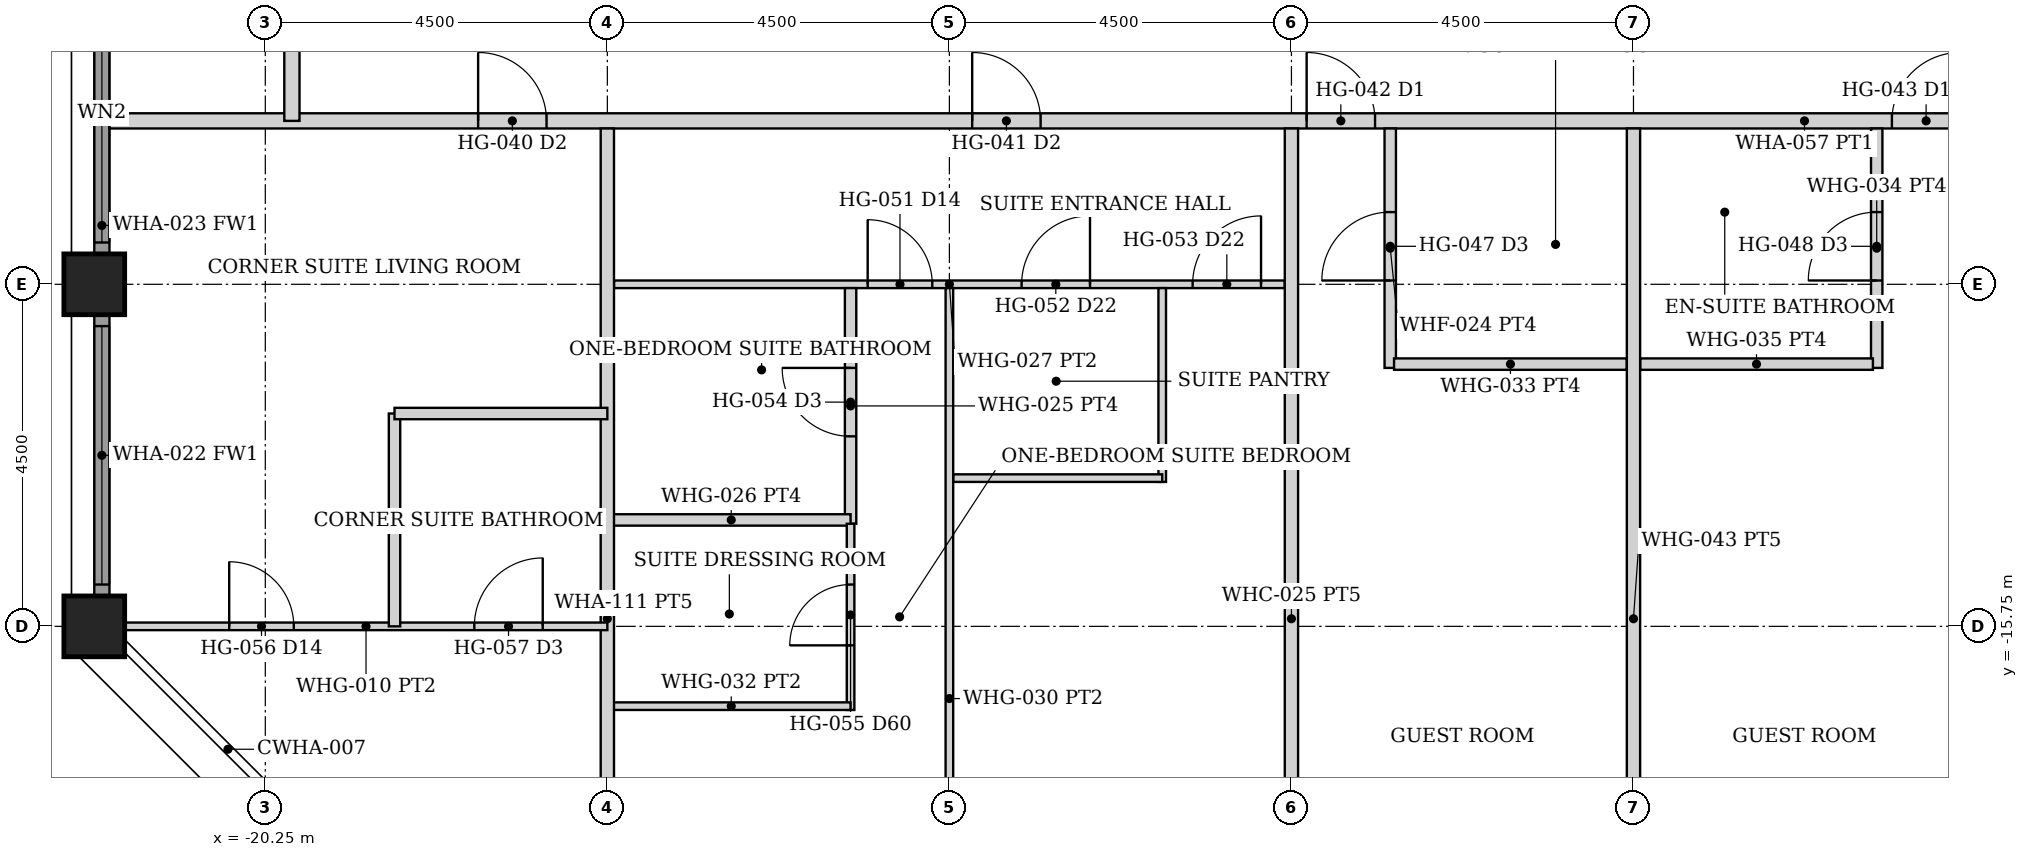
"""IFC4 building model, lengths in metres.
Left out: names, types, materials, properties, quantities, classifications, styles, units other than length and angle.
Written with IfcOpenShell. Run it as: python <this file> out.ifc"""

import sys

from ifc_helpers import new_model, si_unit, direction, frame, frame_2d, origin, origin_2d, place, context, subcontext, project, spatial, rectangle, hollow_rectangle, extrude, element, fill, save


model = new_model("IFC4")
c1 = context("Model", 3, precision=1e-05, world=origin(), true_north=direction((0.0, 1.0)))
c2 = subcontext(c1, "Body", "Model", "MODEL_VIEW")
j1 = project(units=[si_unit("LENGTHUNIT", "METRE"), si_unit("PLANEANGLEUNIT", "RADIAN")], contexts=[c1])
p1 = place(None, origin())
s1 = spatial("IfcSite", under=j1, at=p1, CompositionType="ELEMENT")
p2 = place(p1, origin())
s2 = spatial("IfcBuilding", under=s1, at=p2, CompositionType="ELEMENT")
p3 = place(p2, frame((0.0, 0.0, 183.2)))
s3 = spatial("IfcBuildingStorey", under=s2, at=p3, CompositionType="ELEMENT", Elevation=183.2)
for number, where, z_axis, x_axis in (
    (1, (-22.5, -15.75, 0.0), (0.0, 0.0, 1.0), (1.0, 0.0, 0.0)),
    (2, (-22.5, -11.25, 0.0), (0.0, 0.0, 1.0), (1.0, 0.0, 0.0)),
):
    element("IfcColumn", number, at=place(p3, frame(where, z_axis=z_axis, x_axis=x_axis)), inside=s3, PredefinedType="COLUMN", context=c2, shape_type="SweptSolid", body=[
        extrude(hollow_rectangle(XDim=0.8, YDim=0.8, WallThickness=0.045, at=origin_2d()), origin(), (0.0, 0.0, 1.0), 3.6),
    ])
p4 = place(p3, frame((-22.4, -15.345, 0.0), z_axis=(0.0, 0.0, 1.0), x_axis=(0.0, 1.0, 0.0)))
e3 = element("IfcWall", 3, at=p4, inside=s3, PredefinedType="SOLIDWALL", context=c2, shape_type="SweptSolid", body=[
    extrude(rectangle(XDim=3.69, YDim=0.2, at=frame_2d((1.845, 0.0))), origin(), (0.0, 0.0, 1.0), 2.479),
])
p5 = place(p4, frame((0.145, 0.0, 0.3)))
e4 = element("IfcOpeningElement", 4, at=p5, cuts=e3, PredefinedType="OPENING", context=c2, shape_type="SweptSolid", body=[
    extrude(rectangle(XDim=3.4, YDim=2.029, at=frame_2d((1.7, 1.015))), frame((0.0, 0.11, 0.0), z_axis=(0.0, -1.0, 0.0), x_axis=(1.0, 0.0, 0.0)), (0.0, 0.0, 1.0), 0.22),
])
p6 = place(p3, frame((-22.4, -10.845, 0.0), z_axis=(0.0, 0.0, 1.0), x_axis=(0.0, 1.0, 0.0)))
e5 = element("IfcWall", 5, at=p6, inside=s3, PredefinedType="SOLIDWALL", context=c2, shape_type="SweptSolid", body=[
    extrude(rectangle(XDim=3.69, YDim=0.2, at=frame_2d((1.845, 0.0))), origin(), (0.0, 0.0, 1.0), 2.479),
])
p7 = place(p6, frame((0.145, 0.0, 0.3)))
e6 = element("IfcOpeningElement", 6, at=p7, cuts=e5, PredefinedType="OPENING", context=c2, shape_type="SweptSolid", body=[
    extrude(rectangle(XDim=3.4, YDim=2.029, at=frame_2d((1.7, 1.015))), frame((0.0, 0.11, 0.0), z_axis=(0.0, -1.0, 0.0), x_axis=(1.0, 0.0, 0.0)), (0.0, 0.0, 1.0), 0.22),
])
p8 = place(p3, frame((-22.3, -9.1, 0.0), z_axis=(0.0, 0.0, 1.0), x_axis=(1.0, 0.0, 0.0)))
e7 = element("IfcWall", 7, at=p8, inside=s3, PredefinedType="PARTITIONING", context=c2, shape_type="SweptSolid", body=[
    extrude(rectangle(XDim=44.6, YDim=0.2, at=frame_2d((22.3, 0.0))), origin(), (0.0, 0.0, 1.0), 2.473),
])
p9 = place(p8, frame((11.35, 0.0, 0.0)))
e8 = element("IfcOpeningElement", 8, at=p9, cuts=e7, PredefinedType="OPENING", context=c2, shape_type="SweptSolid", body=[
    extrude(rectangle(XDim=0.9, YDim=2.1, at=frame_2d((0.45, 1.05))), frame((0.0, 0.11, 0.0), z_axis=(0.0, -1.0, 0.0), x_axis=(1.0, 0.0, 0.0)), (0.0, 0.0, 1.0), 0.22),
])
p10 = place(p8, frame((15.75, 0.0, 0.0)))
e9 = element("IfcOpeningElement", 9, at=p10, cuts=e7, PredefinedType="OPENING", context=c2, shape_type="SweptSolid", body=[
    extrude(rectangle(XDim=0.9, YDim=2.1, at=frame_2d((0.45, 1.05))), frame((0.0, 0.11, 0.0), z_axis=(0.0, -1.0, 0.0), x_axis=(1.0, 0.0, 0.0)), (0.0, 0.0, 1.0), 0.22),
])
p11 = place(p8, frame((23.45, 0.0, 0.0)))
e10 = element("IfcOpeningElement", 10, at=p11, cuts=e7, PredefinedType="OPENING", context=c2, shape_type="SweptSolid", body=[
    extrude(rectangle(XDim=0.9, YDim=2.1, at=frame_2d((0.45, 1.05))), frame((0.0, 0.11, 0.0), z_axis=(0.0, -1.0, 0.0), x_axis=(1.0, 0.0, 0.0)), (0.0, 0.0, 1.0), 0.22),
])
p12 = place(p8, frame((24.75, 0.0, 0.0)))
e11 = element("IfcOpeningElement", 11, at=p12, cuts=e7, PredefinedType="OPENING", context=c2, shape_type="SweptSolid", body=[
    extrude(rectangle(XDim=0.9, YDim=2.1, at=frame_2d((0.45, 1.05))), frame((0.0, 0.11, 0.0), z_axis=(0.0, -1.0, 0.0), x_axis=(1.0, 0.0, 0.0)), (0.0, 0.0, 1.0), 0.22),
])
p13 = place(p8, frame((29.25, 0.0, 0.0)))
e12 = element("IfcOpeningElement", 12, at=p13, cuts=e7, PredefinedType="OPENING", context=c2, shape_type="SweptSolid", body=[
    extrude(rectangle(XDim=0.9, YDim=2.1, at=frame_2d((0.45, 1.05))), frame((0.0, 0.11, 0.0), z_axis=(0.0, -1.0, 0.0), x_axis=(1.0, 0.0, 0.0)), (0.0, 0.0, 1.0), 0.22),
])
p14 = place(p8, frame((38.85, 0.0, 0.0)))
e13 = element("IfcOpeningElement", 13, at=p14, cuts=e7, PredefinedType="OPENING", context=c2, shape_type="SweptSolid", body=[
    extrude(rectangle(XDim=0.9, YDim=2.1, at=frame_2d((0.45, 1.05))), frame((0.0, 0.11, 0.0), z_axis=(0.0, -1.0, 0.0), x_axis=(1.0, 0.0, 0.0)), (0.0, 0.0, 1.0), 0.22),
])
p15 = place(p8, frame((4.85, 0.0, 0.0)))
e14 = element("IfcOpeningElement", 14, at=p15, cuts=e7, PredefinedType="OPENING", context=c2, shape_type="SweptSolid", body=[
    extrude(rectangle(XDim=0.9, YDim=2.1, at=frame_2d((0.45, 1.05))), frame((0.0, 0.11, 0.0), z_axis=(0.0, -1.0, 0.0), x_axis=(1.0, 0.0, 0.0)), (0.0, 0.0, 1.0), 0.22),
])
p16 = place(p3, frame((-19.9, -9.1, 0.0), z_axis=(0.0, 0.0, 1.0), x_axis=(0.0, 1.0, 0.0)))
e15 = element("IfcWall", 15, at=p16, inside=s3, PredefinedType="PARTITIONING", context=c2, shape_type="SweptSolid", body=[
    extrude(rectangle(XDim=18.2, YDim=0.2, at=frame_2d((9.1, 0.0))), origin(), (0.0, 0.0, 1.0), 2.473),
])
p17 = place(p16, frame((8.6, 0.0, 0.0)))
e16 = element("IfcOpeningElement", 16, at=p17, cuts=e15, PredefinedType="OPENING", context=c2, shape_type="SweptSolid", body=[
    extrude(rectangle(XDim=1.0, YDim=2.1, at=frame_2d((0.5, 1.05))), frame((0.0, 0.11, 0.0), z_axis=(0.0, -1.0, 0.0), x_axis=(1.0, 0.0, 0.0)), (0.0, 0.0, 1.0), 0.22),
])
p18 = place(p3, frame((-15.663, -11.25, 0.0), z_axis=(0.0, 0.0, 1.0), x_axis=(1.0, 0.0, 0.0)))
e17 = element("IfcWall", 17, at=p18, inside=s3, PredefinedType="PARTITIONING", context=c2, shape_type="SweptSolid", body=[
    extrude(rectangle(XDim=8.825, YDim=0.1, at=frame_2d((4.413, 0.0))), origin(), (0.0, 0.0, 1.0), 2.473),
])
p19 = place(p18, frame((5.363, 0.0, 0.0)))
e18 = element("IfcOpeningElement", 18, at=p19, cuts=e17, PredefinedType="OPENING", context=c2, shape_type="SweptSolid", body=[
    extrude(rectangle(XDim=0.9, YDim=2.1, at=frame_2d((0.45, 1.05))), frame((0.0, 0.06, 0.0), z_axis=(0.0, -1.0, 0.0), x_axis=(1.0, 0.0, 0.0)), (0.0, 0.0, 1.0), 0.12),
])
p20 = place(p18, frame((7.613, 0.0, 0.0)))
e19 = element("IfcOpeningElement", 19, at=p20, cuts=e17, PredefinedType="OPENING", context=c2, shape_type="SweptSolid", body=[
    extrude(rectangle(XDim=0.9, YDim=2.1, at=frame_2d((0.45, 1.05))), frame((0.0, 0.06, 0.0), z_axis=(0.0, -1.0, 0.0), x_axis=(1.0, 0.0, 0.0)), (0.0, 0.0, 1.0), 0.12),
])
p21 = place(p18, frame((3.337, 0.0, 0.0)))
e20 = element("IfcOpeningElement", 20, at=p21, cuts=e17, PredefinedType="OPENING", context=c2, shape_type="SweptSolid", body=[
    extrude(rectangle(XDim=0.85, YDim=2.1, at=frame_2d((0.425, 1.05))), frame((0.0, 0.06, 0.0), z_axis=(0.0, -1.0, 0.0), x_axis=(1.0, 0.0, 0.0)), (0.0, 0.0, 1.0), 0.12),
])
p22 = place(p3, frame((-8.45, -13.85, 0.0), z_axis=(0.0, 0.0, 1.0), x_axis=(0.0, 1.0, 0.0)))
e21 = element("IfcWall", 21, at=p22, inside=s3, PredefinedType="PARTITIONING", context=c2, shape_type="SweptSolid", body=[
    extrude(rectangle(XDim=2.55, YDim=0.1, at=frame_2d((1.275, 0.0))), origin(), (0.0, 0.0, 1.0), 2.473),
])
p23 = place(p3, frame((-11.2, -13.8, 0.0), z_axis=(0.0, 0.0, 1.0), x_axis=(1.0, 0.0, 0.0)))
e22 = element("IfcWall", 22, at=p23, inside=s3, PredefinedType="PARTITIONING", context=c2, shape_type="SweptSolid", body=[
    extrude(rectangle(XDim=2.75, YDim=0.1, at=frame_2d((1.375, 0.0))), origin(), (0.0, 0.0, 1.0), 2.473),
])
p24 = place(p3, frame((-11.25, -22.1, 0.0), z_axis=(0.0, 0.0, 1.0), x_axis=(0.0, 1.0, 0.0)))
e23 = element("IfcWall", 23, at=p24, inside=s3, PredefinedType="PARTITIONING", context=c2, shape_type="SweptSolid", body=[
    extrude(rectangle(XDim=10.8, YDim=0.1, at=frame_2d((5.4, 0.0))), origin(), (0.0, 0.0, 1.0), 2.473),
])
p25 = place(p3, frame((-12.55, -14.4, 0.0), z_axis=(0.0, 0.0, 1.0), x_axis=(0.0, 1.0, 0.0)))
e24 = element("IfcWall", 24, at=p25, inside=s3, PredefinedType="PARTITIONING", context=c2, shape_type="SweptSolid", body=[
    extrude(rectangle(XDim=3.1, YDim=0.15, at=frame_2d((1.55, 0.0))), origin(), (0.0, 0.0, 1.0), 2.473),
])
p26 = place(p25, frame((1.15, 0.0, 0.0)))
e25 = element("IfcOpeningElement", 25, at=p26, cuts=e24, PredefinedType="OPENING", context=c2, shape_type="SweptSolid", body=[
    extrude(rectangle(XDim=0.9, YDim=2.1, at=frame_2d((0.45, 1.05))), frame((0.0, 0.085, 0.0), z_axis=(0.0, -1.0, 0.0), x_axis=(1.0, 0.0, 0.0)), (0.0, 0.0, 1.0), 0.17),
])
p27 = place(p3, frame((-15.69, -14.35, 0.0), z_axis=(0.0, 0.0, 1.0), x_axis=(1.0, 0.0, 0.0)))
e26 = element("IfcWall", 26, at=p27, inside=s3, PredefinedType="PARTITIONING", context=c2, shape_type="SweptSolid", body=[
    extrude(rectangle(XDim=3.14, YDim=0.15, at=frame_2d((1.57, 0.0))), origin(), (0.0, 0.0, 1.0), 2.473),
])
p28 = place(p3, frame((-12.55, -16.85, 0.0), z_axis=(0.0, 0.0, 1.0), x_axis=(0.0, 1.0, 0.0)))
e27 = element("IfcWall", 27, at=p28, inside=s3, PredefinedType="PARTITIONING", context=c2, shape_type="SweptSolid", body=[
    extrude(rectangle(XDim=2.45, YDim=0.1, at=frame_2d((1.225, 0.0))), origin(), (0.0, 0.0, 1.0), 2.473),
])
p29 = place(p28, frame((0.85, 0.0, 0.0)))
e28 = element("IfcOpeningElement", 28, at=p29, cuts=e27, PredefinedType="OPENING", context=c2, shape_type="SweptSolid", body=[
    extrude(rectangle(XDim=0.8, YDim=2.1, at=frame_2d((0.4, 1.05))), frame((0.0, 0.06, 0.0), z_axis=(0.0, -1.0, 0.0), x_axis=(1.0, 0.0, 0.0)), (0.0, 0.0, 1.0), 0.12),
])
p30 = place(p3, frame((-15.69, -16.8, 0.0), z_axis=(0.0, 0.0, 1.0), x_axis=(1.0, 0.0, 0.0)))
e29 = element("IfcWall", 29, at=p30, inside=s3, PredefinedType="PARTITIONING", context=c2, shape_type="SweptSolid", body=[
    extrude(rectangle(XDim=3.14, YDim=0.1, at=frame_2d((1.57, 0.0))), origin(), (0.0, 0.0, 1.0), 2.473),
])
p31 = place(p3, frame((-5.45, -12.35, 0.0), z_axis=(0.0, 0.0, 1.0), x_axis=(0.0, 1.0, 0.0)))
e30 = element("IfcWall", 30, at=p31, inside=s3, PredefinedType="PARTITIONING", context=c2, shape_type="SweptSolid", body=[
    extrude(rectangle(XDim=3.15, YDim=0.15, at=frame_2d((1.575, 0.0))), origin(), (0.0, 0.0, 1.0), 2.473),
])
p32 = place(p31, frame((1.15, 0.0, 0.0)))
e31 = element("IfcOpeningElement", 31, at=p32, cuts=e30, PredefinedType="OPENING", context=c2, shape_type="SweptSolid", body=[
    extrude(rectangle(XDim=0.9, YDim=2.1, at=frame_2d((0.45, 1.05))), frame((0.0, 0.085, 0.0), z_axis=(0.0, -1.0, 0.0), x_axis=(1.0, 0.0, 0.0)), (0.0, 0.0, 1.0), 0.17),
])
p33 = place(p3, frame((-5.4, -12.3, 0.0), z_axis=(0.0, 0.0, 1.0), x_axis=(1.0, 0.0, 0.0)))
e32 = element("IfcWall", 32, at=p33, inside=s3, PredefinedType="PARTITIONING", context=c2, shape_type="SweptSolid", body=[
    extrude(rectangle(XDim=3.062, YDim=0.15, at=frame_2d((1.531, 0.0))), origin(), (0.0, 0.0, 1.0), 2.473),
])
p34 = place(p3, frame((0.95, -12.35, 0.0), z_axis=(0.0, 0.0, 1.0), x_axis=(0.0, 1.0, 0.0)))
e33 = element("IfcWall", 33, at=p34, inside=s3, PredefinedType="PARTITIONING", context=c2, shape_type="SweptSolid", body=[
    extrude(rectangle(XDim=3.15, YDim=0.15, at=frame_2d((1.575, 0.0))), origin(), (0.0, 0.0, 1.0), 2.473),
])
p35 = place(p34, frame((1.15, 0.0, 0.0)))
e34 = element("IfcOpeningElement", 34, at=p35, cuts=e33, PredefinedType="OPENING", context=c2, shape_type="SweptSolid", body=[
    extrude(rectangle(XDim=0.9, YDim=2.1, at=frame_2d((0.45, 1.05))), frame((0.0, 0.085, 0.0), z_axis=(0.0, -1.0, 0.0), x_axis=(1.0, 0.0, 0.0)), (0.0, 0.0, 1.0), 0.17),
])
p36 = place(p3, frame((-2.163, -12.3, 0.0), z_axis=(0.0, 0.0, 1.0), x_axis=(1.0, 0.0, 0.0)))
e35 = element("IfcWall", 35, at=p36, inside=s3, PredefinedType="PARTITIONING", context=c2, shape_type="SweptSolid", body=[
    extrude(rectangle(XDim=3.062, YDim=0.15, at=frame_2d((1.531, 0.0))), origin(), (0.0, 0.0, 1.0), 2.473),
])
for number, where, z_axis, x_axis in (
    (36, (-15.75, -22.1, 0.0), (0.0, 0.0, 1.0), (0.0, 1.0, 0.0)),
    (37, (-6.75, -22.1, 0.0), (0.0, 0.0, 1.0), (0.0, 1.0, 0.0)),
    (38, (-2.25, -22.1, 0.0), (0.0, 0.0, 1.0), (0.0, 1.0, 0.0)),
):
    element("IfcWall", number, at=place(p3, frame(where, z_axis=z_axis, x_axis=x_axis)), inside=s3, PredefinedType="PARTITIONING", context=c2, shape_type="SweptSolid", body=[
        extrude(rectangle(XDim=12.9, YDim=0.175, at=frame_2d((6.45, 0.0))), origin(), (0.0, 0.0, 1.0), 2.473),
    ])
p37 = place(p3, frame((-22.1, -15.75, 0.0), z_axis=(0.0, 0.0, 1.0), x_axis=(1.0, 0.0, 0.0)))
e39 = element("IfcWall", 39, at=p37, inside=s3, PredefinedType="PARTITIONING", context=c2, shape_type="SweptSolid", body=[
    extrude(rectangle(XDim=6.35, YDim=0.1, at=frame_2d((3.175, 0.0))), origin(), (0.0, 0.0, 1.0), 2.473),
])
p38 = place(p37, frame((1.375, 0.0, 0.0)))
e40 = element("IfcOpeningElement", 40, at=p38, cuts=e39, PredefinedType="OPENING", context=c2, shape_type="SweptSolid", body=[
    extrude(rectangle(XDim=0.85, YDim=2.1, at=frame_2d((0.425, 1.05))), frame((0.0, 0.06, 0.0), z_axis=(0.0, -1.0, 0.0), x_axis=(1.0, 0.0, 0.0)), (0.0, 0.0, 1.0), 0.12),
])
p39 = place(p37, frame((4.6, 0.0, 0.0)))
e41 = element("IfcOpeningElement", 41, at=p39, cuts=e39, PredefinedType="OPENING", context=c2, shape_type="SweptSolid", body=[
    extrude(rectangle(XDim=0.9, YDim=2.1, at=frame_2d((0.45, 1.05))), frame((0.0, 0.06, 0.0), z_axis=(0.0, -1.0, 0.0), x_axis=(1.0, 0.0, 0.0)), (0.0, 0.0, 1.0), 0.12),
])
for number, where, z_axis, x_axis in (
    (42, (-18.55, -15.75, 0.0), (0.0, 0.0, 1.0), (0.0, 1.0, 0.0)),
    (43, (-18.55, -12.95, 0.0), (0.0, 0.0, 1.0), (1.0, 0.0, 0.0)),
):
    element("IfcWall", number, at=place(p3, frame(where, z_axis=z_axis, x_axis=x_axis)), inside=s3, PredefinedType="PARTITIONING", context=c2, shape_type="SweptSolid", body=[
        extrude(rectangle(XDim=2.8, YDim=0.15, at=frame_2d((1.4, 0.0))), origin(), (0.0, 0.0, 1.0), 2.473),
    ])
p40 = place(p5, origin())
e44 = element("IfcWindow", 44, at=p40, inside=s3, PartitioningType="SINGLE_PANEL", PredefinedType="WINDOW", context=c2, shape_type="SweptSolid", body=[
    extrude(rectangle(XDim=3.4, YDim=2.029, at=frame_2d((1.7, 1.015))), frame((0.0, 0.03, 0.0), z_axis=(0.0, -1.0, 0.0), x_axis=(1.0, 0.0, 0.0)), (0.0, 0.0, 1.0), 0.06),
])
fill(e4, e44)
p41 = place(p7, origin())
e45 = element("IfcWindow", 45, at=p41, inside=s3, PartitioningType="SINGLE_PANEL", PredefinedType="WINDOW", context=c2, shape_type="SweptSolid", body=[
    extrude(rectangle(XDim=3.4, YDim=2.029, at=frame_2d((1.7, 1.015))), frame((0.0, 0.03, 0.0), z_axis=(0.0, -1.0, 0.0), x_axis=(1.0, 0.0, 0.0)), (0.0, 0.0, 1.0), 0.06),
])
fill(e6, e45)
p42 = place(p9, origin())
e46 = element("IfcDoor", 46, at=p42, inside=s3, OperationType="SINGLE_SWING_LEFT", PredefinedType="DOOR", context=c2, shape_type="SweptSolid", body=[
    extrude(rectangle(XDim=0.9, YDim=2.1, at=frame_2d((0.45, 1.05))), frame((0.0, 0.025, 0.0), z_axis=(0.0, -1.0, 0.0), x_axis=(1.0, 0.0, 0.0)), (0.0, 0.0, 1.0), 0.05),
])
fill(e8, e46)
p43 = place(p19, origin())
e47 = element("IfcDoor", 47, at=p43, inside=s3, OperationType="SINGLE_SWING_RIGHT", PredefinedType="DOOR", context=c2, shape_type="SweptSolid", body=[
    extrude(rectangle(XDim=0.9, YDim=2.1, at=frame_2d((0.45, 1.05))), frame((0.0, 0.025, 0.0), z_axis=(0.0, -1.0, 0.0), x_axis=(1.0, 0.0, 0.0)), (0.0, 0.0, 1.0), 0.05),
])
fill(e18, e47)
p44 = place(p20, origin())
e48 = element("IfcDoor", 48, at=p44, inside=s3, OperationType="SINGLE_SWING_RIGHT", PredefinedType="DOOR", context=c2, shape_type="SweptSolid", body=[
    extrude(rectangle(XDim=0.9, YDim=2.1, at=frame_2d((0.45, 1.05))), frame((0.0, 0.025, 0.0), z_axis=(0.0, -1.0, 0.0), x_axis=(1.0, 0.0, 0.0)), (0.0, 0.0, 1.0), 0.05),
])
fill(e19, e48)
p45 = place(p21, origin())
e49 = element("IfcDoor", 49, at=p45, inside=s3, OperationType="SINGLE_SWING_LEFT", PredefinedType="DOOR", context=c2, shape_type="SweptSolid", body=[
    extrude(rectangle(XDim=0.85, YDim=2.1, at=frame_2d((0.425, 1.05))), frame((0.0, 0.025, 0.0), z_axis=(0.0, -1.0, 0.0), x_axis=(1.0, 0.0, 0.0)), (0.0, 0.0, 1.0), 0.05),
])
fill(e20, e49)
p46 = place(p26, origin())
e50 = element("IfcDoor", 50, at=p46, inside=s3, OperationType="SINGLE_SWING_RIGHT", PredefinedType="DOOR", context=c2, shape_type="SweptSolid", body=[
    extrude(rectangle(XDim=0.9, YDim=2.1, at=frame_2d((0.45, 1.05))), frame((0.0, 0.025, 0.0), z_axis=(0.0, -1.0, 0.0), x_axis=(1.0, 0.0, 0.0)), (0.0, 0.0, 1.0), 0.05),
])
fill(e25, e50)
p47 = place(p29, origin())
e51 = element("IfcDoor", 51, at=p47, inside=s3, OperationType="SINGLE_SWING_LEFT", PredefinedType="DOOR", context=c2, shape_type="SweptSolid", body=[
    extrude(rectangle(XDim=0.8, YDim=2.1, at=frame_2d((0.4, 1.05))), frame((0.0, 0.025, 0.0), z_axis=(0.0, -1.0, 0.0), x_axis=(1.0, 0.0, 0.0)), (0.0, 0.0, 1.0), 0.05),
])
fill(e28, e51)
p48 = place(p10, origin())
e52 = element("IfcDoor", 52, at=p48, inside=s3, OperationType="SINGLE_SWING_LEFT", PredefinedType="DOOR", context=c2, shape_type="SweptSolid", body=[
    extrude(rectangle(XDim=0.9, YDim=2.1, at=frame_2d((0.45, 1.05))), frame((0.0, 0.025, 0.0), z_axis=(0.0, -1.0, 0.0), x_axis=(1.0, 0.0, 0.0)), (0.0, 0.0, 1.0), 0.05),
])
fill(e9, e52)
p49 = place(p32, origin())
e53 = element("IfcDoor", 53, at=p49, inside=s3, OperationType="SINGLE_SWING_LEFT", PredefinedType="DOOR", context=c2, shape_type="SweptSolid", body=[
    extrude(rectangle(XDim=0.9, YDim=2.1, at=frame_2d((0.45, 1.05))), frame((0.0, 0.025, 0.0), z_axis=(0.0, -1.0, 0.0), x_axis=(1.0, 0.0, 0.0)), (0.0, 0.0, 1.0), 0.05),
])
fill(e31, e53)
p50 = place(p11, origin())
e54 = element("IfcDoor", 54, at=p50, inside=s3, OperationType="SINGLE_SWING_RIGHT", PredefinedType="DOOR", context=c2, shape_type="SweptSolid", body=[
    extrude(rectangle(XDim=0.9, YDim=2.1, at=frame_2d((0.45, 1.05))), frame((0.0, 0.025, 0.0), z_axis=(0.0, -1.0, 0.0), x_axis=(1.0, 0.0, 0.0)), (0.0, 0.0, 1.0), 0.05),
])
fill(e10, e54)
p51 = place(p35, origin())
e55 = element("IfcDoor", 55, at=p51, inside=s3, OperationType="SINGLE_SWING_LEFT", PredefinedType="DOOR", context=c2, shape_type="SweptSolid", body=[
    extrude(rectangle(XDim=0.9, YDim=2.1, at=frame_2d((0.45, 1.05))), frame((0.0, 0.025, 0.0), z_axis=(0.0, -1.0, 0.0), x_axis=(1.0, 0.0, 0.0)), (0.0, 0.0, 1.0), 0.05),
])
fill(e34, e55)
p52 = place(p15, origin())
e56 = element("IfcDoor", 56, at=p52, inside=s3, OperationType="SINGLE_SWING_LEFT", PredefinedType="DOOR", context=c2, shape_type="SweptSolid", body=[
    extrude(rectangle(XDim=0.9, YDim=2.1, at=frame_2d((0.45, 1.05))), frame((0.0, 0.025, 0.0), z_axis=(0.0, -1.0, 0.0), x_axis=(1.0, 0.0, 0.0)), (0.0, 0.0, 1.0), 0.05),
])
fill(e14, e56)
p53 = place(p38, origin())
e57 = element("IfcDoor", 57, at=p53, inside=s3, OperationType="SINGLE_SWING_LEFT", PredefinedType="DOOR", context=c2, shape_type="SweptSolid", body=[
    extrude(rectangle(XDim=0.85, YDim=2.1, at=frame_2d((0.425, 1.05))), frame((0.0, 0.025, 0.0), z_axis=(0.0, -1.0, 0.0), x_axis=(1.0, 0.0, 0.0)), (0.0, 0.0, 1.0), 0.05),
])
fill(e40, e57)
p54 = place(p39, origin())
e58 = element("IfcDoor", 58, at=p54, inside=s3, OperationType="SINGLE_SWING_RIGHT", PredefinedType="DOOR", context=c2, shape_type="SweptSolid", body=[
    extrude(rectangle(XDim=0.9, YDim=2.1, at=frame_2d((0.45, 1.05))), frame((0.0, 0.025, 0.0), z_axis=(0.0, -1.0, 0.0), x_axis=(1.0, 0.0, 0.0)), (0.0, 0.0, 1.0), 0.05),
])
fill(e41, e58)
save(model, sys.argv[1])
